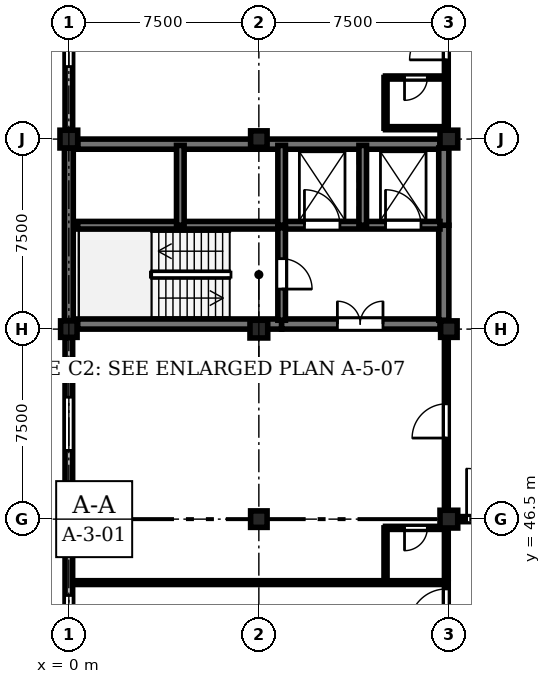
"""IFC4 building model, lengths in metres.
Left out: names, types, materials, properties, quantities, classifications, styles, units other than length and angle.
Written with IfcOpenShell. Run it as: python <this file> out.ifc"""

import sys

from ifc_helpers import new_model, si_unit, direction, frame, frame_2d, origin, origin_2d, place, context, subcontext, project, spatial, rectangle, extrude, element, fill, save


model = new_model("IFC4")
c1 = context("Model", 3, precision=1e-05, world=origin(), true_north=direction((0.0, 1.0)))
c2 = subcontext(c1, "Body", "Model", "MODEL_VIEW")
j1 = project(units=[si_unit("LENGTHUNIT", "METRE"), si_unit("PLANEANGLEUNIT", "RADIAN")], contexts=[c1])
p1 = place(None, origin())
s1 = spatial("IfcSite", under=j1, at=p1, CompositionType="ELEMENT")
p2 = place(p1, origin())
s2 = spatial("IfcBuilding", under=s1, at=p2, CompositionType="ELEMENT")
p3 = place(p2, frame((0.0, 0.0, 17.85)))
s3 = spatial("IfcBuildingStorey", under=s2, at=p3, CompositionType="ELEMENT", Elevation=17.85)
p4 = place(p3, frame((0.0, 46.5, 0.0), z_axis=(0.0, 0.0, 1.0), x_axis=(1.0, 0.0, 0.0)))
e1 = element("IfcColumn", 1, at=p4, inside=s3, PredefinedType="COLUMN", context=c2, shape_type="SweptSolid", body=[
    extrude(rectangle(XDim=0.7, YDim=0.7, at=origin_2d()), origin(), (0.0, 0.0, 1.0), 4.05),
])
p5 = place(p3, frame((0.0, 54.0, 0.0), z_axis=(0.0, 0.0, 1.0), x_axis=(1.0, 0.0, 0.0)))
e2 = element("IfcColumn", 2, at=p5, inside=s3, PredefinedType="COLUMN", context=c2, shape_type="SweptSolid", body=[
    extrude(rectangle(XDim=0.65, YDim=0.65, at=origin_2d()), origin(), (0.0, 0.0, 1.0), 4.05),
])
p6 = place(p3, frame((0.0, 61.5, 0.0), z_axis=(0.0, 0.0, 1.0), x_axis=(1.0, 0.0, 0.0)))
e3 = element("IfcColumn", 3, at=p6, inside=s3, PredefinedType="COLUMN", context=c2, shape_type="SweptSolid", body=[
    extrude(rectangle(XDim=0.7, YDim=0.7, at=origin_2d()), origin(), (0.0, 0.0, 1.0), 4.05),
])
p7 = place(p3, frame((7.5, 46.5, 0.0), z_axis=(0.0, 0.0, 1.0), x_axis=(1.0, 0.0, 0.0)))
e4 = element("IfcColumn", 4, at=p7, inside=s3, PredefinedType="COLUMN", context=c2, shape_type="SweptSolid", body=[
    extrude(rectangle(XDim=0.65, YDim=0.65, at=origin_2d()), origin(), (0.0, 0.0, 1.0), 4.05),
])
p8 = place(p3, frame((7.5, 54.0, 0.0), z_axis=(0.0, 0.0, 1.0), x_axis=(1.0, 0.0, 0.0)))
e5 = element("IfcColumn", 5, at=p8, inside=s3, PredefinedType="COLUMN", context=c2, shape_type="SweptSolid", body=[
    extrude(rectangle(XDim=0.7, YDim=0.7, at=origin_2d()), origin(), (0.0, 0.0, 1.0), 4.05),
])
p9 = place(p3, frame((7.5, 61.5, 0.0), z_axis=(0.0, 0.0, 1.0), x_axis=(1.0, 0.0, 0.0)))
e6 = element("IfcColumn", 6, at=p9, inside=s3, PredefinedType="COLUMN", context=c2, shape_type="SweptSolid", body=[
    extrude(rectangle(XDim=0.65, YDim=0.65, at=origin_2d()), origin(), (0.0, 0.0, 1.0), 4.05),
])
p10 = place(p3, frame((15.0, 46.5, 0.0), z_axis=(0.0, 0.0, 1.0), x_axis=(1.0, 0.0, 0.0)))
e7 = element("IfcColumn", 7, at=p10, inside=s3, PredefinedType="COLUMN", context=c2, shape_type="SweptSolid", body=[
    extrude(rectangle(XDim=0.7, YDim=0.7, at=origin_2d()), origin(), (0.0, 0.0, 1.0), 4.05),
])
p11 = place(p3, frame((15.0, 54.0, 0.0), z_axis=(0.0, 0.0, 1.0), x_axis=(1.0, 0.0, 0.0)))
e8 = element("IfcColumn", 8, at=p11, inside=s3, PredefinedType="COLUMN", context=c2, shape_type="SweptSolid", body=[
    extrude(rectangle(XDim=0.65, YDim=0.65, at=origin_2d()), origin(), (0.0, 0.0, 1.0), 4.05),
])
p12 = place(p3, frame((15.0, 61.5, 0.0), z_axis=(0.0, 0.0, 1.0), x_axis=(1.0, 0.0, 0.0)))
e9 = element("IfcColumn", 9, at=p12, inside=s3, PredefinedType="COLUMN", context=c2, shape_type="SweptSolid", body=[
    extrude(rectangle(XDim=0.7, YDim=0.7, at=origin_2d()), origin(), (0.0, 0.0, 1.0), 4.05),
])
p13 = place(p3, frame((0.0, 39.335, 0.0), z_axis=(0.0, 0.0, 1.0), x_axis=(0.0, 1.0, 0.0)))
e10 = element("IfcWall", 10, at=p13, inside=s3, PredefinedType="STANDARD", context=c2, shape_type="SweptSolid", body=[
    extrude(rectangle(XDim=6.805, YDim=0.3, at=frame_2d((3.402, 0.0))), origin(), (0.0, 0.0, 1.0), 3.17),
])
p14 = place(p13, frame((2.653, 0.0, 0.9)))
e11 = element("IfcOpeningElement", 11, at=p14, cuts=e10, PredefinedType="OPENING", context=c2, shape_type="SweptSolid", body=[
    extrude(rectangle(XDim=1.5, YDim=1.99, at=frame_2d((0.75, 0.995))), frame((0.0, 0.16, 0.0), z_axis=(0.0, -1.0, 0.0), x_axis=(1.0, 0.0, 0.0)), (0.0, 0.0, 1.0), 0.32),
])
p15 = place(p3, frame((0.0, 46.86, 0.0), z_axis=(0.0, 0.0, 1.0), x_axis=(0.0, 1.0, 0.0)))
e12 = element("IfcWall", 12, at=p15, inside=s3, PredefinedType="STANDARD", context=c2, shape_type="SweptSolid", body=[
    extrude(rectangle(XDim=6.805, YDim=0.3, at=frame_2d((3.402, 0.0))), origin(), (0.0, 0.0, 1.0), 3.17),
])
p16 = place(p15, frame((2.353, 0.0, 0.9)))
e13 = element("IfcOpeningElement", 13, at=p16, cuts=e12, PredefinedType="OPENING", context=c2, shape_type="SweptSolid", body=[
    extrude(rectangle(XDim=2.1, YDim=1.99, at=frame_2d((1.05, 0.995))), frame((0.0, 0.16, 0.0), z_axis=(0.0, -1.0, 0.0), x_axis=(1.0, 0.0, 0.0)), (0.0, 0.0, 1.0), 0.32),
])
p17 = place(p3, frame((0.0, 54.335, 0.0), z_axis=(0.0, 0.0, 1.0), x_axis=(0.0, 1.0, 0.0)))
e14 = element("IfcWall", 14, at=p17, inside=s3, PredefinedType="SHEAR", context=c2, shape_type="SweptSolid", body=[
    extrude(rectangle(XDim=6.805, YDim=0.35, at=frame_2d((3.402, 0.0))), origin(), (0.0, 0.0, 1.0), 3.77),
])
p18 = place(p3, frame((0.0, 61.86, 0.0), z_axis=(0.0, 0.0, 1.0), x_axis=(0.0, 1.0, 0.0)))
e15 = element("IfcWall", 15, at=p18, inside=s3, PredefinedType="STANDARD", context=c2, shape_type="SweptSolid", body=[
    extrude(rectangle(XDim=6.805, YDim=0.3, at=frame_2d((3.402, 0.0))), origin(), (0.0, 0.0, 1.0), 3.17),
])
p19 = place(p18, frame((2.502, 0.0, 0.9)))
e16 = element("IfcOpeningElement", 16, at=p19, cuts=e15, PredefinedType="OPENING", context=c2, shape_type="SweptSolid", body=[
    extrude(rectangle(XDim=1.8, YDim=1.99, at=frame_2d((0.9, 0.995))), frame((0.0, 0.16, 0.0), z_axis=(0.0, -1.0, 0.0), x_axis=(1.0, 0.0, 0.0)), (0.0, 0.0, 1.0), 0.32),
])
p20 = place(p3, frame((0.35, 54.2, 0.0), z_axis=(0.0, 0.0, 1.0), x_axis=(1.0, 0.0, 0.0)))
e17 = element("IfcWall", 17, at=p20, inside=s3, PredefinedType="SHEAR", context=c2, shape_type="SweptSolid", body=[
    extrude(rectangle(XDim=8.05, YDim=0.4, at=frame_2d((4.025, 0.0))), origin(), (0.0, 0.0, 1.0), 3.77),
])
p21 = place(p3, frame((8.4, 54.2, 0.0), z_axis=(0.0, 0.0, 1.0), x_axis=(1.0, 0.0, 0.0)))
e18 = element("IfcWall", 18, at=p21, inside=s3, PredefinedType="SHEAR", context=c2, shape_type="SweptSolid", body=[
    extrude(rectangle(XDim=6.25, YDim=0.4, at=frame_2d((3.125, 0.0))), origin(), (0.0, 0.0, 1.0), 3.77),
])
p22 = place(p21, frame((2.2, 0.0, 0.0)))
e19 = element("IfcOpeningElement", 19, at=p22, cuts=e18, PredefinedType="OPENING", context=c2, shape_type="SweptSolid", body=[
    extrude(rectangle(XDim=1.8, YDim=2.25, at=frame_2d((0.9, 1.125))), frame((0.0, 0.21, 0.0), z_axis=(0.0, -1.0, 0.0), x_axis=(1.0, 0.0, 0.0)), (0.0, 0.0, 1.0), 0.42),
])
p23 = place(p3, frame((0.35, 61.3, 0.0), z_axis=(0.0, 0.0, 1.0), x_axis=(1.0, 0.0, 0.0)))
e20 = element("IfcWall", 20, at=p23, inside=s3, PredefinedType="SHEAR", context=c2, shape_type="SweptSolid", body=[
    extrude(rectangle(XDim=14.3, YDim=0.4, at=frame_2d((7.15, 0.0))), origin(), (0.0, 0.0, 1.0), 3.77),
])
p24 = place(p3, frame((14.8, 54.35, 0.0), z_axis=(0.0, 0.0, 1.0), x_axis=(0.0, 1.0, 0.0)))
e21 = element("IfcWall", 21, at=p24, inside=s3, PredefinedType="SHEAR", context=c2, shape_type="SweptSolid", body=[
    extrude(rectangle(XDim=3.75, YDim=0.4, at=frame_2d((1.875, 0.0))), origin(), (0.0, 0.0, 1.0), 3.77),
])
p25 = place(p3, frame((14.8, 58.1, 0.0), z_axis=(0.0, 0.0, 1.0), x_axis=(0.0, 1.0, 0.0)))
e22 = element("IfcWall", 22, at=p25, inside=s3, PredefinedType="SHEAR", context=c2, shape_type="SweptSolid", body=[
    extrude(rectangle(XDim=3.05, YDim=0.4, at=frame_2d((1.525, 0.0))), origin(), (0.0, 0.0, 1.0), 3.77),
])
p26 = place(p3, frame((0.35, 58.1, 0.0), z_axis=(0.0, 0.0, 1.0), x_axis=(1.0, 0.0, 0.0)))
e23 = element("IfcWall", 23, at=p26, inside=s3, PredefinedType="SHEAR", context=c2, shape_type="SweptSolid", body=[
    extrude(rectangle(XDim=8.05, YDim=0.3, at=frame_2d((4.025, 0.0))), origin(), (0.0, 0.0, 1.0), 3.77),
])
p27 = place(p3, frame((8.4, 58.1, 0.0), z_axis=(0.0, 0.0, 1.0), x_axis=(1.0, 0.0, 0.0)))
e24 = element("IfcWall", 24, at=p27, inside=s3, PredefinedType="SHEAR", context=c2, shape_type="SweptSolid", body=[
    extrude(rectangle(XDim=6.25, YDim=0.3, at=frame_2d((3.125, 0.0))), origin(), (0.0, 0.0, 1.0), 3.77),
])
p28 = place(p27, frame((0.9, 0.0, 0.0)))
e25 = element("IfcOpeningElement", 25, at=p28, cuts=e24, PredefinedType="OPENING", context=c2, shape_type="SweptSolid", body=[
    extrude(rectangle(XDim=1.4, YDim=2.25, at=frame_2d((0.7, 1.125))), frame((0.0, 0.16, 0.0), z_axis=(0.0, -1.0, 0.0), x_axis=(1.0, 0.0, 0.0)), (0.0, 0.0, 1.0), 0.32),
])
p29 = place(p27, frame((4.1, 0.0, 0.0)))
e26 = element("IfcOpeningElement", 26, at=p29, cuts=e24, PredefinedType="OPENING", context=c2, shape_type="SweptSolid", body=[
    extrude(rectangle(XDim=1.4, YDim=2.25, at=frame_2d((0.7, 1.125))), frame((0.0, 0.16, 0.0), z_axis=(0.0, -1.0, 0.0), x_axis=(1.0, 0.0, 0.0)), (0.0, 0.0, 1.0), 0.32),
])
p30 = place(p3, frame((8.4, 58.0, 0.0), z_axis=(0.0, 0.0, 1.0), x_axis=(0.0, -1.0, 0.0)))
e27 = element("IfcWall", 27, at=p30, inside=s3, PredefinedType="SHEAR", context=c2, shape_type="SweptSolid", body=[
    extrude(rectangle(XDim=3.65, YDim=0.3, at=frame_2d((1.825, 0.0))), origin(), (0.0, 0.0, 1.0), 3.77),
])
p31 = place(p30, frame((1.22, 0.0, 0.0)))
e28 = element("IfcOpeningElement", 28, at=p31, cuts=e27, PredefinedType="OPENING", context=c2, shape_type="SweptSolid", body=[
    extrude(rectangle(XDim=1.2, YDim=2.25, at=frame_2d((0.6, 1.125))), frame((0.0, 0.16, 0.0), z_axis=(0.0, -1.0, 0.0), x_axis=(1.0, 0.0, 0.0)), (0.0, 0.0, 1.0), 0.32),
])
for number, where, z_axis, x_axis in (
    (29, (4.4, 58.1, 0.0), (0.0, 0.0, 1.0), (0.0, 1.0, 0.0)),
    (30, (8.4, 58.1, 0.0), (0.0, 0.0, 1.0), (0.0, 1.0, 0.0)),
    (31, (11.6, 58.1, 0.0), (0.0, 0.0, 1.0), (0.0, 1.0, 0.0)),
):
    element("IfcWall", number, at=place(p3, frame(where, z_axis=z_axis, x_axis=x_axis)), inside=s3, PredefinedType="SHEAR", context=c2, shape_type="SweptSolid", body=[
        extrude(rectangle(XDim=3.15, YDim=0.3, at=frame_2d((1.575, 0.0))), origin(), (0.0, 0.0, 1.0), 3.77),
    ])
p32 = place(p3, frame((14.9, 34.58, 0.0), z_axis=(0.0, 0.0, 1.0), x_axis=(0.0, 1.0, 0.0)))
e32 = element("IfcWall", 32, at=p32, inside=s3, PredefinedType="PARTITIONING", context=c2, shape_type="SweptSolid", body=[
    extrude(rectangle(XDim=9.415, YDim=0.15, at=frame_2d((4.708, 0.0))), origin(), (0.0, 0.0, 1.0), 3.205),
])
p33 = place(p32, frame((7.715, 0.0, 0.0)))
e33 = element("IfcOpeningElement", 33, at=p33, cuts=e32, PredefinedType="OPENING", context=c2, shape_type="SweptSolid", body=[
    extrude(rectangle(XDim=1.45, YDim=2.3, at=frame_2d((0.725, 1.15))), frame((0.0, 0.085, 0.0), z_axis=(0.0, -1.0, 0.0), x_axis=(1.0, 0.0, 0.0)), (0.0, 0.0, 1.0), 0.17),
])
p34 = place(p3, frame((14.9, 44.155, 0.0), z_axis=(0.0, 0.0, 1.0), x_axis=(0.0, 1.0, 0.0)))
e34 = element("IfcWall", 34, at=p34, inside=s3, PredefinedType="PARTITIONING", context=c2, shape_type="SweptSolid", body=[
    extrude(rectangle(XDim=9.415, YDim=0.15, at=frame_2d((4.708, 0.0))), origin(), (0.0, 0.0, 1.0), 3.205),
])
p35 = place(p34, frame((5.545, 0.0, 0.0)))
e35 = element("IfcOpeningElement", 35, at=p35, cuts=e34, PredefinedType="OPENING", context=c2, shape_type="SweptSolid", body=[
    extrude(rectangle(XDim=1.35, YDim=2.25, at=frame_2d((0.675, 1.125))), frame((0.0, 0.085, 0.0), z_axis=(0.0, -1.0, 0.0), x_axis=(1.0, 0.0, 0.0)), (0.0, 0.0, 1.0), 0.17),
])
p36 = place(p3, frame((14.9, 46.155, 0.0), z_axis=(0.0, 0.0, 1.0), x_axis=(-1.0, 0.0, 0.0)))
e36 = element("IfcWall", 36, at=p36, inside=s3, PredefinedType="PARTITIONING", context=c2, shape_type="SweptSolid", body=[
    extrude(rectangle(XDim=2.4, YDim=0.12, at=frame_2d((1.2, 0.0))), origin(), (0.0, 0.0, 1.0), 3.205),
])
p37 = place(p36, frame((0.75, 0.0, 0.0)))
e37 = element("IfcOpeningElement", 37, at=p37, cuts=e36, PredefinedType="OPENING", context=c2, shape_type="SweptSolid", body=[
    extrude(rectangle(XDim=0.9, YDim=2.1, at=frame_2d((0.45, 1.05))), frame((0.0, 0.07, 0.0), z_axis=(0.0, -1.0, 0.0), x_axis=(1.0, 0.0, 0.0)), (0.0, 0.0, 1.0), 0.14),
])
p38 = place(p3, frame((12.5, 44.155, 0.0), z_axis=(0.0, 0.0, 1.0), x_axis=(0.0, 1.0, 0.0)))
e38 = element("IfcWall", 38, at=p38, inside=s3, PredefinedType="PARTITIONING", context=c2, shape_type="SweptSolid", body=[
    extrude(rectangle(XDim=2.0, YDim=0.12, at=frame_2d((1.0, 0.0))), origin(), (0.0, 0.0, 1.0), 3.755),
])
p39 = place(p3, frame((14.9, 61.93, 0.0), z_axis=(0.0, 0.0, 1.0), x_axis=(0.0, 1.0, 0.0)))
e39 = element("IfcWall", 39, at=p39, inside=s3, PredefinedType="PARTITIONING", context=c2, shape_type="SweptSolid", body=[
    extrude(rectangle(XDim=10.107, YDim=0.15, at=frame_2d((5.053, 0.0))), origin(), (0.0, 0.0, 1.0), 3.205),
])
p40 = place(p39, frame((2.697, 0.0, 0.0)))
e40 = element("IfcOpeningElement", 40, at=p40, cuts=e39, PredefinedType="OPENING", context=c2, shape_type="SweptSolid", body=[
    extrude(rectangle(XDim=1.45, YDim=2.3, at=frame_2d((0.725, 1.15))), frame((0.0, 0.085, 0.0), z_axis=(0.0, -1.0, 0.0), x_axis=(1.0, 0.0, 0.0)), (0.0, 0.0, 1.0), 0.17),
])
p41 = place(p3, frame((14.9, 63.93, 0.0), z_axis=(0.0, 0.0, 1.0), x_axis=(-1.0, 0.0, 0.0)))
e41 = element("IfcWall", 41, at=p41, inside=s3, PredefinedType="PARTITIONING", context=c2, shape_type="SweptSolid", body=[
    extrude(rectangle(XDim=2.4, YDim=0.12, at=frame_2d((1.2, 0.0))), origin(), (0.0, 0.0, 1.0), 3.755),
])
p42 = place(p41, frame((0.75, 0.0, 0.0)))
e42 = element("IfcOpeningElement", 42, at=p42, cuts=e41, PredefinedType="OPENING", context=c2, shape_type="SweptSolid", body=[
    extrude(rectangle(XDim=0.9, YDim=2.1, at=frame_2d((0.45, 1.05))), frame((0.0, 0.07, 0.0), z_axis=(0.0, -1.0, 0.0), x_axis=(1.0, 0.0, 0.0)), (0.0, 0.0, 1.0), 0.14),
])
p43 = place(p3, frame((12.5, 61.93, 0.0), z_axis=(0.0, 0.0, 1.0), x_axis=(0.0, 1.0, 0.0)))
e43 = element("IfcWall", 43, at=p43, inside=s3, PredefinedType="PARTITIONING", context=c2, shape_type="SweptSolid", body=[
    extrude(rectangle(XDim=2.0, YDim=0.12, at=frame_2d((1.0, 0.0))), origin(), (0.0, 0.0, 1.0), 3.755),
])
p44 = place(p3, frame((0.35, 43.995, 0.0), z_axis=(0.0, 0.0, 1.0), x_axis=(1.0, 0.0, 0.0)))
e44 = element("IfcWall", 44, at=p44, inside=s3, PredefinedType="PARTITIONING", context=c2, shape_type="SweptSolid", body=[
    extrude(rectangle(XDim=14.55, YDim=0.15, at=frame_2d((7.275, 0.0))), origin(), (0.0, 0.0, 1.0), 3.755),
])
p45 = place(p3, frame((12.5, 61.93, 0.0), z_axis=(0.0, 0.0, 1.0), x_axis=(1.0, 0.0, 0.0)))
e45 = element("IfcWall", 45, at=p45, inside=s3, PredefinedType="PARTITIONING", context=c2, shape_type="SweptSolid", body=[
    extrude(rectangle(XDim=2.4, YDim=0.12, at=frame_2d((1.2, 0.0))), origin(), (0.0, 0.0, 1.0), 3.755),
])
p46 = place(p3, frame((15.2, 46.5, 0.0), z_axis=(0.0, 0.0, 1.0), x_axis=(1.0, 0.0, 0.0)))
e46 = element("IfcWall", 46, at=p46, inside=s3, PredefinedType="STANDARD", context=c2, shape_type="SweptSolid", body=[
    extrude(rectangle(XDim=3.0, YDim=0.2, at=frame_2d((1.5, 0.0))), origin(), (0.0, 0.0, 1.0), 3.155),
])
p47 = place(p46, frame((0.5, 0.0, 0.0)))
e47 = element("IfcOpeningElement", 47, at=p47, cuts=e46, PredefinedType="OPENING", context=c2, shape_type="SweptSolid", body=[
    extrude(rectangle(XDim=2.0, YDim=2.3, at=frame_2d((1.0, 1.15))), frame((0.0, 0.11, 0.0), z_axis=(0.0, -1.0, 0.0), x_axis=(1.0, 0.0, 0.0)), (0.0, 0.0, 1.0), 0.22),
])
p48 = place(p14, origin())
e48 = element("IfcWindow", 48, at=p48, inside=s3, PartitioningType="SINGLE_PANEL", PredefinedType="WINDOW", context=c2, shape_type="SweptSolid", body=[
    extrude(rectangle(XDim=1.5, YDim=1.99, at=frame_2d((0.75, 0.995))), frame((0.0, 0.03, 0.0), z_axis=(0.0, -1.0, 0.0), x_axis=(1.0, 0.0, 0.0)), (0.0, 0.0, 1.0), 0.06),
])
fill(e11, e48)
p49 = place(p16, origin())
e49 = element("IfcWindow", 49, at=p49, inside=s3, PartitioningType="SINGLE_PANEL", PredefinedType="WINDOW", context=c2, shape_type="SweptSolid", body=[
    extrude(rectangle(XDim=2.1, YDim=1.99, at=frame_2d((1.05, 0.995))), frame((0.0, 0.03, 0.0), z_axis=(0.0, -1.0, 0.0), x_axis=(1.0, 0.0, 0.0)), (0.0, 0.0, 1.0), 0.06),
])
fill(e13, e49)
p50 = place(p19, origin())
e50 = element("IfcWindow", 50, at=p50, inside=s3, PartitioningType="SINGLE_PANEL", PredefinedType="WINDOW", context=c2, shape_type="SweptSolid", body=[
    extrude(rectangle(XDim=1.8, YDim=1.99, at=frame_2d((0.9, 0.995))), frame((0.0, 0.03, 0.0), z_axis=(0.0, -1.0, 0.0), x_axis=(1.0, 0.0, 0.0)), (0.0, 0.0, 1.0), 0.06),
])
fill(e16, e50)
p51 = place(p22, origin())
e51 = element("IfcDoor", 51, at=p51, inside=s3, OperationType="DOUBLE_DOOR_SINGLE_SWING", PredefinedType="DOOR", context=c2, shape_type="SweptSolid", body=[
    extrude(rectangle(XDim=1.8, YDim=2.25, at=frame_2d((0.9, 1.125))), frame((0.0, 0.025, 0.0), z_axis=(0.0, -1.0, 0.0), x_axis=(1.0, 0.0, 0.0)), (0.0, 0.0, 1.0), 0.05),
])
fill(e19, e51)
p52 = place(p28, origin())
e52 = element("IfcDoor", 52, at=p52, inside=s3, OperationType="DOUBLE_DOOR_SLIDING", PredefinedType="DOOR", context=c2, shape_type="SweptSolid", body=[
    extrude(rectangle(XDim=1.4, YDim=2.25, at=frame_2d((0.7, 1.125))), frame((0.0, 0.025, 0.0), z_axis=(0.0, -1.0, 0.0), x_axis=(1.0, 0.0, 0.0)), (0.0, 0.0, 1.0), 0.05),
])
fill(e25, e52)
p53 = place(p29, origin())
e53 = element("IfcDoor", 53, at=p53, inside=s3, OperationType="DOUBLE_DOOR_SLIDING", PredefinedType="DOOR", context=c2, shape_type="SweptSolid", body=[
    extrude(rectangle(XDim=1.4, YDim=2.25, at=frame_2d((0.7, 1.125))), frame((0.0, 0.025, 0.0), z_axis=(0.0, -1.0, 0.0), x_axis=(1.0, 0.0, 0.0)), (0.0, 0.0, 1.0), 0.05),
])
fill(e26, e53)
p54 = place(p31, origin())
e54 = element("IfcDoor", 54, at=p54, inside=s3, OperationType="SINGLE_SWING_RIGHT", PredefinedType="DOOR", context=c2, shape_type="SweptSolid", body=[
    extrude(rectangle(XDim=1.2, YDim=2.25, at=frame_2d((0.6, 1.125))), frame((0.0, 0.025, 0.0), z_axis=(0.0, -1.0, 0.0), x_axis=(1.0, 0.0, 0.0)), (0.0, 0.0, 1.0), 0.05),
])
fill(e28, e54)
p55 = place(p33, origin())
e55 = element("IfcDoor", 55, at=p55, inside=s3, OperationType="SINGLE_SWING_LEFT", PredefinedType="DOOR", context=c2, shape_type="SweptSolid", body=[
    extrude(rectangle(XDim=1.45, YDim=2.3, at=frame_2d((0.725, 1.15))), frame((0.0, 0.025, 0.0), z_axis=(0.0, -1.0, 0.0), x_axis=(1.0, 0.0, 0.0)), (0.0, 0.0, 1.0), 0.05),
])
fill(e33, e55)
p56 = place(p35, origin())
e56 = element("IfcDoor", 56, at=p56, inside=s3, OperationType="SINGLE_SWING_LEFT", PredefinedType="DOOR", context=c2, shape_type="SweptSolid", body=[
    extrude(rectangle(XDim=1.35, YDim=2.25, at=frame_2d((0.675, 1.125))), frame((0.0, 0.025, 0.0), z_axis=(0.0, -1.0, 0.0), x_axis=(1.0, 0.0, 0.0)), (0.0, 0.0, 1.0), 0.05),
])
fill(e35, e56)
p57 = place(p37, origin())
e57 = element("IfcDoor", 57, at=p57, inside=s3, OperationType="SINGLE_SWING_RIGHT", PredefinedType="DOOR", context=c2, shape_type="SweptSolid", body=[
    extrude(rectangle(XDim=0.9, YDim=2.1, at=frame_2d((0.45, 1.05))), frame((0.0, 0.025, 0.0), z_axis=(0.0, -1.0, 0.0), x_axis=(1.0, 0.0, 0.0)), (0.0, 0.0, 1.0), 0.05),
])
fill(e37, e57)
p58 = place(p40, origin())
e58 = element("IfcDoor", 58, at=p58, inside=s3, OperationType="SINGLE_SWING_LEFT", PredefinedType="DOOR", context=c2, shape_type="SweptSolid", body=[
    extrude(rectangle(XDim=1.45, YDim=2.3, at=frame_2d((0.725, 1.15))), frame((0.0, 0.025, 0.0), z_axis=(0.0, -1.0, 0.0), x_axis=(1.0, 0.0, 0.0)), (0.0, 0.0, 1.0), 0.05),
])
fill(e40, e58)
p59 = place(p42, origin())
e59 = element("IfcDoor", 59, at=p59, inside=s3, OperationType="SINGLE_SWING_RIGHT", PredefinedType="DOOR", context=c2, shape_type="SweptSolid", body=[
    extrude(rectangle(XDim=0.9, YDim=2.1, at=frame_2d((0.45, 1.05))), frame((0.0, 0.025, 0.0), z_axis=(0.0, -1.0, 0.0), x_axis=(1.0, 0.0, 0.0)), (0.0, 0.0, 1.0), 0.05),
])
fill(e42, e59)
p60 = place(p47, origin())
e60 = element("IfcDoor", 60, at=p60, inside=s3, OperationType="DOUBLE_DOOR_SINGLE_SWING", PredefinedType="DOOR", context=c2, shape_type="SweptSolid", body=[
    extrude(rectangle(XDim=2.0, YDim=2.3, at=frame_2d((1.0, 1.15))), frame((0.0, 0.025, 0.0), z_axis=(0.0, -1.0, 0.0), x_axis=(1.0, 0.0, 0.0)), (0.0, 0.0, 1.0), 0.05),
])
fill(e47, e60)
save(model, sys.argv[1])
